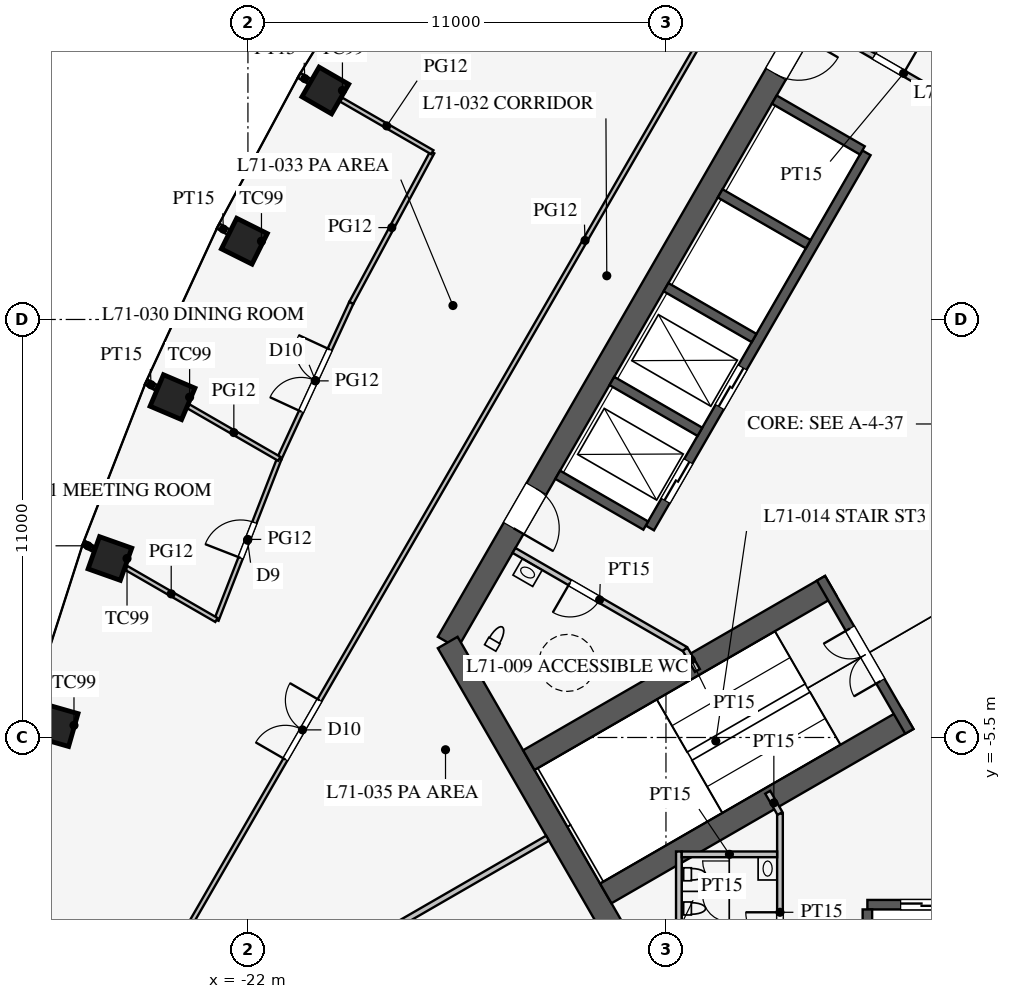
"""IFC4 building model, lengths in metres.
Left out: names, types, materials, properties, quantities, classifications, styles, units other than length and angle.
Written with IfcOpenShell. Run it as: python <this file> out.ifc"""

import sys

from ifc_helpers import new_model, si_unit, direction, frame, frame_2d, origin, origin_2d, place, context, subcontext, project, spatial, rectangle, extrude, element, fill, save


model = new_model("IFC4")
c1 = context("Model", 3, precision=1e-05, world=origin(), true_north=direction((0.0, 1.0)))
c2 = subcontext(c1, "Body", "Model", "MODEL_VIEW")
j1 = project(units=[si_unit("LENGTHUNIT", "METRE"), si_unit("PLANEANGLEUNIT", "RADIAN")], contexts=[c1])
p1 = place(None, origin())
s1 = spatial("IfcSite", under=j1, at=p1, CompositionType="ELEMENT")
p2 = place(p1, origin())
s2 = spatial("IfcBuilding", under=s1, at=p2, CompositionType="ELEMENT")
p3 = place(p2, frame((0.0, 0.0, 309.9)))
s3 = spatial("IfcBuildingStorey", under=s2, at=p3, CompositionType="ELEMENT", Elevation=309.9)
for number, where, z_axis, x_axis in (
    (1, (-19.963, 11.526, 0.0), (0.0, 0.0, 1.0), (-0.5, -0.866, 0.0)),
    (2, (-22.094, 7.56, 0.0), (0.0, 0.0, 1.0), (-0.447, -0.895, 0.0)),
    (3, (-23.985, 3.455, 0.0), (0.0, 0.0, 1.0), (-0.391, -0.92, 0.0)),
    (4, (-25.632, -0.79, 0.0), (0.0, 0.0, 1.0), (-0.334, -0.942, 0.0)),
    (5, (-27.027, -5.18, 0.0), (0.0, 0.0, 1.0), (-0.275, -0.961, 0.0)),
):
    element("IfcColumn", number, at=place(p3, frame(where, z_axis=z_axis, x_axis=x_axis)), inside=s3, PredefinedType="COLUMN", context=c2, shape_type="SweptSolid", body=[
        extrude(rectangle(XDim=0.9, YDim=0.9, at=origin_2d()), origin(), (0.0, 0.0, 1.0), 4.2),
    ])
p4 = place(p3, frame((-5.773, 16.0, 0.0), z_axis=(0.0, 0.0, 1.0), x_axis=(-0.500002442456, -0.866023993627, 0.0)))
e6 = element("IfcWall", 6, at=p4, inside=s3, PredefinedType="SHEAR", context=c2, shape_type="SweptSolid", body=[
    extrude(rectangle(XDim=21.939, YDim=0.6, at=frame_2d((10.97, 0.0))), origin(), (0.0, 0.0, 1.0), 4.2),
])
p5 = place(p4, frame((17.27, 0.0, 0.0)))
e7 = element("IfcOpeningElement", 7, at=p5, cuts=e6, PredefinedType="OPENING", context=c2, shape_type="SweptSolid", body=[
    extrude(rectangle(XDim=1.2, YDim=2.1, at=frame_2d((0.6, 1.05))), frame((0.0, 0.31, 0.0), z_axis=(0.0, -1.0, 0.0), x_axis=(1.0, 0.0, 0.0)), (0.0, 0.0, 1.0), 0.62),
])
p6 = place(p4, frame((3.47, 0.0, 0.0)))
e8 = element("IfcOpeningElement", 8, at=p6, cuts=e6, PredefinedType="OPENING", context=c2, shape_type="SweptSolid", body=[
    extrude(rectangle(XDim=1.2, YDim=2.1, at=frame_2d((0.6, 1.05))), frame((0.0, 0.31, 0.0), z_axis=(0.0, -1.0, 0.0), x_axis=(1.0, 0.0, 0.0)), (0.0, 0.0, 1.0), 0.62),
])
p7 = place(p3, frame((-16.743, -3.0, 0.0), z_axis=(0.0, 0.0, 1.0), x_axis=(0.499995765644, -0.866027848477, 0.0)))
e9 = element("IfcWall", 9, at=p7, inside=s3, PredefinedType="SHEAR", context=c2, shape_type="SweptSolid", body=[
    extrude(rectangle(XDim=11.547, YDim=0.6, at=frame_2d((5.773, 0.0))), origin(), (0.0, 0.0, 1.0), 4.2),
])
p8 = place(p3, frame((-5.7, -9.9, 0.0), z_axis=(0.0, 0.0, 1.0), x_axis=(1.0, 0.0, 0.0)))
e10 = element("IfcWall", 10, at=p8, inside=s3, PredefinedType="SHEAR", context=c2, shape_type="SweptSolid", body=[
    extrude(rectangle(XDim=11.4, YDim=0.25, at=frame_2d((5.7, 0.0))), origin(), (0.0, 0.0, 1.0), 4.2),
])
p9 = place(p8, frame((0.875, 0.0, 0.0)))
e11 = element("IfcOpeningElement", 11, at=p9, cuts=e10, PredefinedType="OPENING", context=c2, shape_type="SweptSolid", body=[
    extrude(rectangle(XDim=1.1, YDim=2.2, at=frame_2d((0.55, 1.1))), frame((0.0, 0.135, 0.0), z_axis=(0.0, -1.0, 0.0), x_axis=(1.0, 0.0, 0.0)), (0.0, 0.0, 1.0), 0.27),
])
p10 = place(p8, frame((3.725, 0.0, 0.0)))
e12 = element("IfcOpeningElement", 12, at=p10, cuts=e10, PredefinedType="OPENING", context=c2, shape_type="SweptSolid", body=[
    extrude(rectangle(XDim=1.1, YDim=2.2, at=frame_2d((0.55, 1.1))), frame((0.0, 0.135, 0.0), z_axis=(0.0, -1.0, 0.0), x_axis=(1.0, 0.0, 0.0)), (0.0, 0.0, 1.0), 0.27),
])
p11 = place(p8, frame((6.575, 0.0, 0.0)))
e13 = element("IfcOpeningElement", 13, at=p11, cuts=e10, PredefinedType="OPENING", context=c2, shape_type="SweptSolid", body=[
    extrude(rectangle(XDim=1.1, YDim=2.2, at=frame_2d((0.55, 1.1))), frame((0.0, 0.135, 0.0), z_axis=(0.0, -1.0, 0.0), x_axis=(1.0, 0.0, 0.0)), (0.0, 0.0, 1.0), 0.27),
])
p12 = place(p8, frame((9.425, 0.0, 0.0)))
e14 = element("IfcOpeningElement", 14, at=p12, cuts=e10, PredefinedType="OPENING", context=c2, shape_type="SweptSolid", body=[
    extrude(rectangle(XDim=1.1, YDim=2.2, at=frame_2d((0.55, 1.1))), frame((0.0, 0.135, 0.0), z_axis=(0.0, -1.0, 0.0), x_axis=(1.0, 0.0, 0.0)), (0.0, 0.0, 1.0), 0.27),
])
p13 = place(p3, frame((-5.7, -10.025, 0.0), z_axis=(0.0, 0.0, 1.0), x_axis=(0.0, -1.0, 0.0)))
e15 = element("IfcWall", 15, at=p13, inside=s3, PredefinedType="SHEAR", context=c2, shape_type="SweptSolid", body=[
    extrude(rectangle(XDim=2.675, YDim=0.25, at=frame_2d((1.337, 0.0))), origin(), (0.0, 0.0, 1.0), 4.2),
])
p14 = place(p3, frame((-5.724, 9.886, 0.0), z_axis=(0.0, 0.0, 1.0), x_axis=(-0.500001763848, -0.866024385424, 0.0)))
e16 = element("IfcWall", 16, at=p14, inside=s3, PredefinedType="SHEAR", context=c2, shape_type="SweptSolid", body=[
    extrude(rectangle(XDim=11.4, YDim=0.25, at=frame_2d((5.7, 0.0))), origin(), (0.0, 0.0, 1.0), 4.2),
])
p15 = place(p14, frame((6.525, 0.0, 0.0)))
e17 = element("IfcOpeningElement", 17, at=p15, cuts=e16, PredefinedType="OPENING", context=c2, shape_type="SweptSolid", body=[
    extrude(rectangle(XDim=1.2, YDim=2.2, at=frame_2d((0.6, 1.1))), frame((0.0, 0.135, 0.0), z_axis=(0.0, -1.0, 0.0), x_axis=(1.0, 0.0, 0.0)), (0.0, 0.0, 1.0), 0.27),
])
p16 = place(p14, frame((9.375, 0.0, 0.0)))
e18 = element("IfcOpeningElement", 18, at=p16, cuts=e16, PredefinedType="OPENING", context=c2, shape_type="SweptSolid", body=[
    extrude(rectangle(XDim=1.2, YDim=2.2, at=frame_2d((0.6, 1.1))), frame((0.0, 0.135, 0.0), z_axis=(0.0, -1.0, 0.0), x_axis=(1.0, 0.0, 0.0)), (0.0, 0.0, 1.0), 0.27),
])
for number, where, z_axis, x_axis in (
    (19, (-5.832, 9.949, 0.0), (0.0, 0.0, 1.0), (-0.866, 0.5, 0.0)),
    (20, (-7.257, 7.481, 0.0), (0.0, 0.0, 1.0), (-0.866, 0.5, 0.0)),
    (21, (-8.682, 5.012, 0.0), (0.0, 0.0, 1.0), (-0.866, 0.5, 0.0)),
    (22, (-10.107, 2.544, 0.0), (0.0, 0.0, 1.0), (-0.866, 0.5, 0.0)),
    (23, (-11.532, 0.076, 0.0), (0.0, 0.0, 1.0), (-0.866, 0.5, 0.0)),
):
    element("IfcWall", number, at=place(p3, frame(where, z_axis=z_axis, x_axis=x_axis)), inside=s3, PredefinedType="SHEAR", context=c2, shape_type="SweptSolid", body=[
        extrude(rectangle(XDim=2.675, YDim=0.25, at=frame_2d((1.337, 0.0))), origin(), (0.0, 0.0, 1.0), 4.2),
    ])
p17 = place(p3, frame((-6.663, -1.509, 0.0), z_axis=(0.0, 0.0, 1.0), x_axis=(-0.86603049496, -0.499991181721, 0.0)))
e24 = element("IfcWall", 24, at=p17, inside=s3, PredefinedType="SHEAR", context=c2, shape_type="SweptSolid", body=[
    extrude(rectangle(XDim=9.175, YDim=0.6, at=frame_2d((4.587, 0.0))), origin(), (0.0, 0.0, 1.0), 4.2),
])
p18 = place(p3, frame((-4.638, -5.016, 0.0), z_axis=(0.0, 0.0, 1.0), x_axis=(-0.866012320003, -0.50002266109, 0.0)))
e25 = element("IfcWall", 25, at=p18, inside=s3, PredefinedType="SHEAR", context=c2, shape_type="SweptSolid", body=[
    extrude(rectangle(XDim=9.175, YDim=0.6, at=frame_2d((4.587, 0.0))), origin(), (0.0, 0.0, 1.0), 4.2),
])
p19 = place(p3, frame((-6.922, -1.312, 0.0), z_axis=(0.0, 0.0, 1.0), x_axis=(0.499984536904, -0.866034331223, 0.0)))
e26 = element("IfcWall", 26, at=p19, inside=s3, PredefinedType="SHEAR", context=c2, shape_type="SweptSolid", body=[
    extrude(rectangle(XDim=4.65, YDim=0.25, at=frame_2d((2.325, 0.0))), origin(), (0.0, 0.0, 1.0), 4.2),
])
p20 = place(p19, frame((1.525, 0.0, 0.0)))
e27 = element("IfcOpeningElement", 27, at=p20, cuts=e26, PredefinedType="OPENING", context=c2, shape_type="SweptSolid", body=[
    extrude(rectangle(XDim=1.6, YDim=2.1, at=frame_2d((0.8, 1.05))), frame((0.0, 0.135, 0.0), z_axis=(0.0, -1.0, 0.0), x_axis=(1.0, 0.0, 0.0)), (0.0, 0.0, 1.0), 0.27),
])
p21 = place(p3, frame((-8.0, -7.5, 0.0), z_axis=(0.0, 0.0, 1.0), x_axis=(0.0, -1.0, 0.0)))
e28 = element("IfcWall", 28, at=p21, inside=s3, PredefinedType="PARTITIONING", context=c2, shape_type="SweptSolid", body=[
    extrude(rectangle(XDim=5.2, YDim=0.15, at=frame_2d((2.6, 0.0))), origin(), (0.0, 0.0, 1.0), 4.0),
])
p22 = place(p21, frame((2.6, 0.0, 0.0)))
e29 = element("IfcOpeningElement", 29, at=p22, cuts=e28, PredefinedType="OPENING", context=c2, shape_type="SweptSolid", body=[
    extrude(rectangle(XDim=0.9, YDim=2.1, at=frame_2d((0.45, 1.05))), frame((0.0, 0.085, 0.0), z_axis=(0.0, -1.0, 0.0), x_axis=(1.0, 0.0, 0.0)), (0.0, 0.0, 1.0), 0.17),
])
p23 = place(p3, frame((-10.495, -3.178, 0.0), z_axis=(0.0, 0.0, 1.0), x_axis=(-0.866021400173, 0.500006934395, 0.0)))
e30 = element("IfcWall", 30, at=p23, inside=s3, PredefinedType="PARTITIONING", context=c2, shape_type="SweptSolid", body=[
    extrude(rectangle(XDim=5.2, YDim=0.15, at=frame_2d((2.6, 0.0))), origin(), (0.0, 0.0, 1.0), 4.0),
])
p24 = place(p23, frame((2.6, 0.0, 0.0)))
e31 = element("IfcOpeningElement", 31, at=p24, cuts=e30, PredefinedType="OPENING", context=c2, shape_type="SweptSolid", body=[
    extrude(rectangle(XDim=0.9, YDim=2.1, at=frame_2d((0.45, 1.05))), frame((0.0, 0.085, 0.0), z_axis=(0.0, -1.0, 0.0), x_axis=(1.0, 0.0, 0.0)), (0.0, 0.0, 1.0), 0.17),
])
p25 = place(p3, frame((-2.495, 10.678, 0.0), z_axis=(0.0, 0.0, 1.0), x_axis=(-0.866021400173, 0.500006934395, 0.0)))
e32 = element("IfcWall", 32, at=p25, inside=s3, PredefinedType="PARTITIONING", context=c2, shape_type="SweptSolid", body=[
    extrude(rectangle(XDim=5.2, YDim=0.15, at=frame_2d((2.6, 0.0))), origin(), (0.0, 0.0, 1.0), 4.0),
])
p26 = place(p25, frame((2.6, 0.0, 0.0)))
e33 = element("IfcOpeningElement", 33, at=p26, cuts=e32, PredefinedType="OPENING", context=c2, shape_type="SweptSolid", body=[
    extrude(rectangle(XDim=0.9, YDim=2.1, at=frame_2d((0.45, 1.05))), frame((0.0, 0.085, 0.0), z_axis=(0.0, -1.0, 0.0), x_axis=(1.0, 0.0, 0.0)), (0.0, 0.0, 1.0), 0.17),
])
for number, where, z_axis, x_axis in (
    (34, (-10.495, -3.178, 0.0), (0.0, 0.0, 1.0), (0.5, -0.866, 0.0)),
    (35, (-8.0, -7.5, 0.0), (0.0, 0.0, 1.0), (-0.5, 0.866, 0.0)),
):
    element("IfcWall", number, at=place(p3, frame(where, z_axis=z_axis, x_axis=x_axis)), inside=s3, PredefinedType="PARTITIONING", context=c2, shape_type="SweptSolid", body=[
        extrude(rectangle(XDim=0.645, YDim=0.15, at=frame_2d((0.323, 0.0))), origin(), (0.0, 0.0, 1.0), 4.0),
    ])
p27 = place(p3, frame((-10.66, -8.5, 0.0), z_axis=(0.0, 0.0, 1.0), x_axis=(0.0, -1.0, 0.0)))
e36 = element("IfcWall", 36, at=p27, inside=s3, PredefinedType="PARTITIONING", context=c2, shape_type="SweptSolid", body=[
    extrude(rectangle(XDim=4.1, YDim=0.15, at=frame_2d((2.05, 0.0))), origin(), (0.0, 0.0, 1.0), 4.0),
])
p28 = place(p3, frame((-8.075, -8.575, 0.0), z_axis=(0.0, 0.0, 1.0), x_axis=(-1.0, 0.0, 0.0)))
e37 = element("IfcWall", 37, at=p28, inside=s3, PredefinedType="PARTITIONING", context=c2, shape_type="SweptSolid", body=[
    extrude(rectangle(XDim=2.51, YDim=0.15, at=frame_2d((1.255, 0.0))), origin(), (0.0, 0.0, 1.0), 4.0),
])
p29 = place(p3, frame((-14.116, -8.15, 0.0), z_axis=(0.0, 0.0, 1.0), x_axis=(-0.866020541135, -0.500008422262, 0.0)))
e38 = element("IfcWall", 38, at=p29, inside=s3, PredefinedType="PARTITIONING", context=c2, shape_type="SweptSolid", body=[
    extrude(rectangle(XDim=13.45, YDim=0.15, at=frame_2d((6.725, 0.0))), origin(), (0.0, 0.0, 1.0), 2.5),
])
p30 = place(p3, frame((-0.29, 29.818, 0.0), z_axis=(0.0, 0.0, 1.0), x_axis=(-0.500000361757, -0.866025194924, 0.0)))
e39 = element("IfcWall", 39, at=p30, inside=s3, PredefinedType="PARTITIONING", context=c2, shape_type="SweptSolid", body=[
    extrude(rectangle(XDim=51.355, YDim=0.12, at=frame_2d((25.678, 0.0))), origin(), (0.0, 0.0, 1.0), 2.9),
])
p31 = place(p30, frame((9.9, 0.0, 0.15)))
e40 = element("IfcOpeningElement", 40, at=p31, cuts=e39, PredefinedType="OPENING", context=c2, shape_type="SweptSolid", body=[
    extrude(rectangle(XDim=1.8, YDim=2.1, at=frame_2d((0.9, 1.05))), frame((0.0, 0.07, 0.0), z_axis=(0.0, -1.0, 0.0), x_axis=(1.0, 0.0, 0.0)), (0.0, 0.0, 1.0), 0.14),
])
p32 = place(p30, frame((39.65, 0.0, 0.15)))
e41 = element("IfcOpeningElement", 41, at=p32, cuts=e39, PredefinedType="OPENING", context=c2, shape_type="SweptSolid", body=[
    extrude(rectangle(XDim=1.8, YDim=2.1, at=frame_2d((0.9, 1.05))), frame((0.0, 0.07, 0.0), z_axis=(0.0, -1.0, 0.0), x_axis=(1.0, 0.0, 0.0)), (0.0, 0.0, 1.0), 0.14),
])
p33 = place(p3, frame((-20.356, 11.753, 0.0), z_axis=(0.0, 0.0, 1.0), x_axis=(-0.865899514186, 0.500217983815, 0.0)))
e42 = element("IfcWall", 42, at=p33, inside=s3, PredefinedType="PARTITIONING", context=c2, shape_type="SweptSolid", body=[
    extrude(rectangle(XDim=0.341, YDim=0.15, at=frame_2d((0.17, 0.0))), origin(), (0.0, 0.0, 1.0), 2.9),
])
p34 = place(p3, frame((-26.089, -0.526, 0.0), z_axis=(0.0, 0.0, 1.0), x_axis=(-0.865982457891, 0.500074377092, 0.0)))
e43 = element("IfcWall", 43, at=p34, inside=s3, PredefinedType="PARTITIONING", context=c2, shape_type="SweptSolid", body=[
    extrude(rectangle(XDim=0.28, YDim=0.15, at=frame_2d((0.14, 0.0))), origin(), (0.0, 0.0, 1.0), 2.9),
])
p35 = place(p3, frame((-22.51, 7.8, 0.0), z_axis=(0.0, 0.0, 1.0), x_axis=(-0.866095534226, 0.499878510834, 0.0)))
e44 = element("IfcWall", 44, at=p35, inside=s3, PredefinedType="PARTITIONING", context=c2, shape_type="SweptSolid", body=[
    extrude(rectangle(XDim=0.316, YDim=0.15, at=frame_2d((0.158, 0.0))), origin(), (0.0, 0.0, 1.0), 2.9),
])
p36 = place(p3, frame((-24.422, 3.708, 0.0), z_axis=(0.0, 0.0, 1.0), x_axis=(-0.866254317358, 0.499603300288, 0.0)))
e45 = element("IfcWall", 45, at=p36, inside=s3, PredefinedType="PARTITIONING", context=c2, shape_type="SweptSolid", body=[
    extrude(rectangle(XDim=0.296, YDim=0.15, at=frame_2d((0.148, 0.0))), origin(), (0.0, 0.0, 1.0), 2.9),
])
p37 = place(p3, frame((-17.149, 9.901, 0.0), z_axis=(0.0, 0.0, 1.0), x_axis=(-0.473566170147, -0.880758242932, 0.0)))
e46 = element("IfcWall", 46, at=p37, inside=s3, PredefinedType="PARTITIONING", context=c2, shape_type="SweptSolid", body=[
    extrude(rectangle(XDim=4.502, YDim=0.12, at=frame_2d((2.251, 0.0))), origin(), (0.0, 0.0, 1.0), 2.9),
])
p38 = place(p3, frame((-19.281, 5.936, 0.0), z_axis=(0.0, 0.0, 1.0), x_axis=(-0.419270595022, -0.907861315483, 0.0)))
e47 = element("IfcWall", 47, at=p38, inside=s3, PredefinedType="PARTITIONING", context=c2, shape_type="SweptSolid", body=[
    extrude(rectangle(XDim=4.519, YDim=0.12, at=frame_2d((2.259, 0.0))), origin(), (0.0, 0.0, 1.0), 2.9),
])
p39 = place(p38, frame((1.35, 0.0, 0.15)))
e48 = element("IfcOpeningElement", 48, at=p39, cuts=e47, PredefinedType="OPENING", context=c2, shape_type="SweptSolid", body=[
    extrude(rectangle(XDim=1.8, YDim=2.1, at=frame_2d((0.9, 1.05))), frame((0.0, 0.07, 0.0), z_axis=(0.0, -1.0, 0.0), x_axis=(1.0, 0.0, 0.0)), (0.0, 0.0, 1.0), 0.14),
])
p40 = place(p3, frame((-21.175, 1.833, 0.0), z_axis=(0.0, 0.0, 1.0), x_axis=(-0.363230297573, -0.931699388711, 0.0)))
e49 = element("IfcWall", 49, at=p40, inside=s3, PredefinedType="PARTITIONING", context=c2, shape_type="SweptSolid", body=[
    extrude(rectangle(XDim=4.552, YDim=0.12, at=frame_2d((2.276, 0.0))), origin(), (0.0, 0.0, 1.0), 2.9),
])
p41 = place(p40, frame((1.8, 0.0, 0.15)))
e50 = element("IfcOpeningElement", 50, at=p41, cuts=e49, PredefinedType="OPENING", context=c2, shape_type="SweptSolid", body=[
    extrude(rectangle(XDim=1.0, YDim=2.1, at=frame_2d((0.5, 1.05))), frame((0.0, 0.07, 0.0), z_axis=(0.0, -1.0, 0.0), x_axis=(1.0, 0.0, 0.0)), (0.0, 0.0, 1.0), 0.14),
])
p42 = place(p3, frame((-17.149, 9.901, 0.0), z_axis=(0.0, 0.0, 1.0), x_axis=(-0.866027073272, 0.499997108352, 0.0)))
e51 = element("IfcWall", 51, at=p42, inside=s3, PredefinedType="PARTITIONING", context=c2, shape_type="SweptSolid", body=[
    extrude(rectangle(XDim=2.77, YDim=0.12, at=frame_2d((1.385, 0.0))), origin(), (0.0, 0.0, 1.0), 2.9),
])
p43 = place(p3, frame((-22.829, -2.408, 0.0), z_axis=(0.0, 0.0, 1.0), x_axis=(-0.866031754707, 0.499988999718, 0.0)))
e52 = element("IfcWall", 52, at=p43, inside=s3, PredefinedType="PARTITIONING", context=c2, shape_type="SweptSolid", body=[
    extrude(rectangle(XDim=2.749, YDim=0.12, at=frame_2d((1.374, 0.0))), origin(), (0.0, 0.0, 1.0), 2.9),
])
p44 = place(p3, frame((-21.175, 1.833, 0.0), z_axis=(0.0, 0.0, 1.0), x_axis=(-0.86602506628, 0.500000584575, 0.0)))
e53 = element("IfcWall", 53, at=p44, inside=s3, PredefinedType="PARTITIONING", context=c2, shape_type="SweptSolid", body=[
    extrude(rectangle(XDim=2.761, YDim=0.12, at=frame_2d((1.38, 0.0))), origin(), (0.0, 0.0, 1.0), 2.9),
])
p45 = place(p22, frame((0.9, 0.0, 0.0), z_axis=(0.0, 0.0, 1.0), x_axis=(-1.0, 0.0, 0.0)))
e54 = element("IfcDoor", 54, at=p45, inside=s3, OperationType="SINGLE_SWING_RIGHT", PredefinedType="DOOR", context=c2, shape_type="SweptSolid", body=[
    extrude(rectangle(XDim=0.9, YDim=2.1, at=frame_2d((0.45, 1.05))), frame((0.0, 0.025, 0.0), z_axis=(0.0, -1.0, 0.0), x_axis=(1.0, 0.0, 0.0)), (0.0, 0.0, 1.0), 0.05),
])
fill(e29, e54)
p46 = place(p24, origin())
e55 = element("IfcDoor", 55, at=p46, inside=s3, OperationType="SINGLE_SWING_RIGHT", PredefinedType="DOOR", context=c2, shape_type="SweptSolid", body=[
    extrude(rectangle(XDim=0.9, YDim=2.1, at=frame_2d((0.45, 1.05))), frame((0.0, 0.025, 0.0), z_axis=(0.0, -1.0, 0.0), x_axis=(1.0, 0.0, 0.0)), (0.0, 0.0, 1.0), 0.05),
])
fill(e31, e55)
p47 = place(p26, frame((0.9, 0.0, 0.0), z_axis=(0.0, 0.0, 1.0), x_axis=(-1.0, 0.0, 0.0)))
e56 = element("IfcDoor", 56, at=p47, inside=s3, OperationType="SINGLE_SWING_RIGHT", PredefinedType="DOOR", context=c2, shape_type="SweptSolid", body=[
    extrude(rectangle(XDim=0.9, YDim=2.1, at=frame_2d((0.45, 1.05))), frame((0.0, 0.025, 0.0), z_axis=(0.0, -1.0, 0.0), x_axis=(1.0, 0.0, 0.0)), (0.0, 0.0, 1.0), 0.05),
])
fill(e33, e56)
p48 = place(p20, frame((1.6, 0.0, 0.0), z_axis=(0.0, 0.0, 1.0), x_axis=(-1.0, 0.0, 0.0)))
e57 = element("IfcDoor", 57, at=p48, inside=s3, OperationType="DOUBLE_DOOR_SINGLE_SWING", PredefinedType="DOOR", context=c2, shape_type="SweptSolid", body=[
    extrude(rectangle(XDim=1.6, YDim=2.1, at=frame_2d((0.8, 1.05))), frame((0.0, 0.025, 0.0), z_axis=(0.0, -1.0, 0.0), x_axis=(1.0, 0.0, 0.0)), (0.0, 0.0, 1.0), 0.05),
])
fill(e27, e57)
p49 = place(p5, origin())
e58 = element("IfcDoor", 58, at=p49, inside=s3, OperationType="SINGLE_SWING_RIGHT", PredefinedType="DOOR", context=c2, shape_type="SweptSolid", body=[
    extrude(rectangle(XDim=1.2, YDim=2.1, at=frame_2d((0.6, 1.05))), frame((0.0, 0.025, 0.0), z_axis=(0.0, -1.0, 0.0), x_axis=(1.0, 0.0, 0.0)), (0.0, 0.0, 1.0), 0.05),
])
fill(e7, e58)
p50 = place(p6, origin())
e59 = element("IfcDoor", 59, at=p50, inside=s3, OperationType="SINGLE_SWING_LEFT", PredefinedType="DOOR", context=c2, shape_type="SweptSolid", body=[
    extrude(rectangle(XDim=1.2, YDim=2.1, at=frame_2d((0.6, 1.05))), frame((0.0, 0.025, 0.0), z_axis=(0.0, -1.0, 0.0), x_axis=(1.0, 0.0, 0.0)), (0.0, 0.0, 1.0), 0.05),
])
fill(e8, e59)
p51 = place(p39, frame((1.8, 0.0, 0.0), z_axis=(0.0, 0.0, 1.0), x_axis=(-1.0, 0.0, 0.0)))
e60 = element("IfcDoor", 60, at=p51, inside=s3, OperationType="DOUBLE_DOOR_SINGLE_SWING", PredefinedType="DOOR", context=c2, shape_type="SweptSolid", body=[
    extrude(rectangle(XDim=1.8, YDim=2.1, at=frame_2d((0.9, 1.05))), frame((0.0, 0.025, 0.0), z_axis=(0.0, -1.0, 0.0), x_axis=(1.0, 0.0, 0.0)), (0.0, 0.0, 1.0), 0.05),
])
fill(e48, e60)
p52 = place(p41, frame((1.0, 0.0, 0.0), z_axis=(0.0, 0.0, 1.0), x_axis=(-1.0, 0.0, 0.0)))
e61 = element("IfcDoor", 61, at=p52, inside=s3, OperationType="SINGLE_SWING_LEFT", PredefinedType="DOOR", context=c2, shape_type="SweptSolid", body=[
    extrude(rectangle(XDim=1.0, YDim=2.1, at=frame_2d((0.5, 1.05))), frame((0.0, 0.025, 0.0), z_axis=(0.0, -1.0, 0.0), x_axis=(1.0, 0.0, 0.0)), (0.0, 0.0, 1.0), 0.05),
])
fill(e50, e61)
p53 = place(p32, frame((1.8, 0.0, 0.0), z_axis=(0.0, 0.0, 1.0), x_axis=(-1.0, 0.0, 0.0)))
e62 = element("IfcDoor", 62, at=p53, inside=s3, OperationType="DOUBLE_DOOR_SINGLE_SWING", PredefinedType="DOOR", context=c2, shape_type="SweptSolid", body=[
    extrude(rectangle(XDim=1.8, YDim=2.1, at=frame_2d((0.9, 1.05))), frame((0.0, 0.025, 0.0), z_axis=(0.0, -1.0, 0.0), x_axis=(1.0, 0.0, 0.0)), (0.0, 0.0, 1.0), 0.05),
])
fill(e41, e62)
p54 = place(p9, origin())
e63 = element("IfcDoor", 63, at=p54, inside=s3, OperationType="DOUBLE_DOOR_SLIDING", PredefinedType="DOOR", context=c2, shape_type="SweptSolid", body=[
    extrude(rectangle(XDim=1.1, YDim=2.2, at=frame_2d((0.55, 1.1))), frame((0.0, 0.025, 0.0), z_axis=(0.0, -1.0, 0.0), x_axis=(1.0, 0.0, 0.0)), (0.0, 0.0, 1.0), 0.05),
])
fill(e11, e63)
p55 = place(p15, origin())
e64 = element("IfcDoor", 64, at=p55, inside=s3, OperationType="DOUBLE_DOOR_SLIDING", PredefinedType="DOOR", context=c2, shape_type="SweptSolid", body=[
    extrude(rectangle(XDim=1.2, YDim=2.2, at=frame_2d((0.6, 1.1))), frame((0.0, 0.025, 0.0), z_axis=(0.0, -1.0, 0.0), x_axis=(1.0, 0.0, 0.0)), (0.0, 0.0, 1.0), 0.05),
])
fill(e17, e64)
p56 = place(p16, origin())
e65 = element("IfcDoor", 65, at=p56, inside=s3, OperationType="DOUBLE_DOOR_SLIDING", PredefinedType="DOOR", context=c2, shape_type="SweptSolid", body=[
    extrude(rectangle(XDim=1.2, YDim=2.2, at=frame_2d((0.6, 1.1))), frame((0.0, 0.025, 0.0), z_axis=(0.0, -1.0, 0.0), x_axis=(1.0, 0.0, 0.0)), (0.0, 0.0, 1.0), 0.05),
])
fill(e18, e65)
save(model, sys.argv[1])
